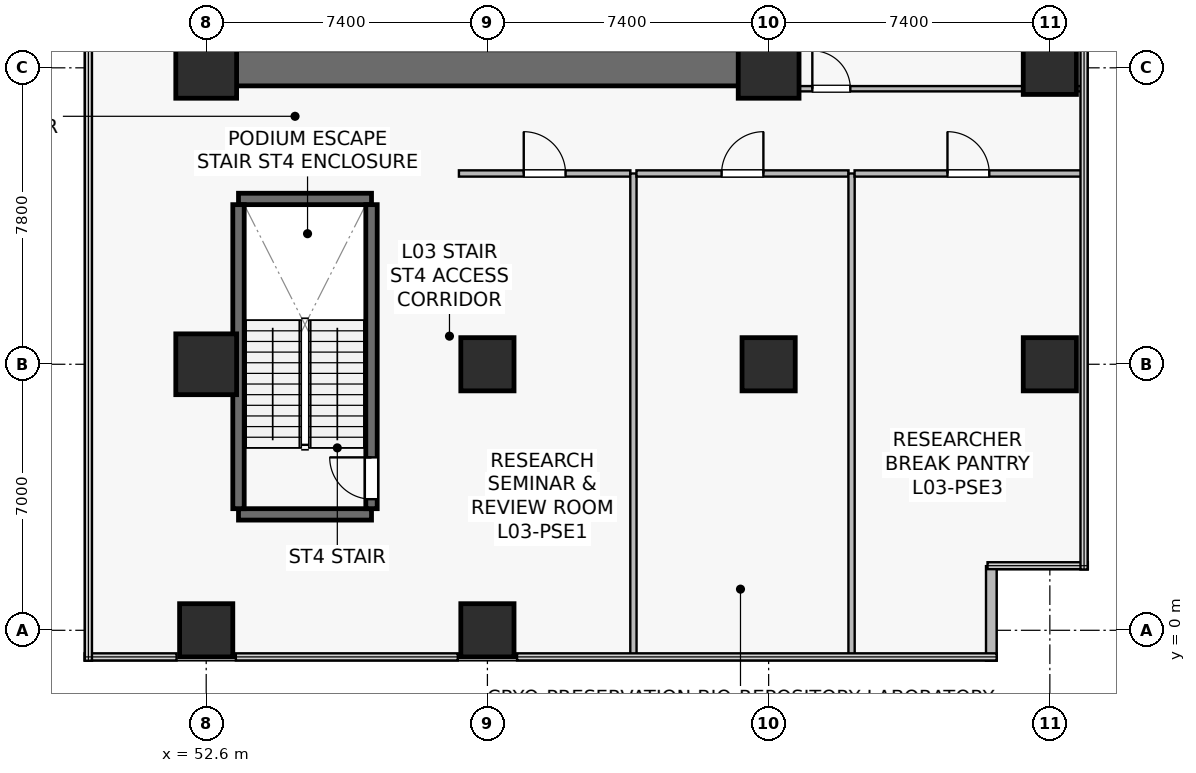
"""IFC4 building model, lengths in metres.
Left out: names, types, materials, properties, quantities, classifications, styles, units other than length and angle.
Written with IfcOpenShell. Run it as: python <this file> out.ifc"""

import sys

from ifc_helpers import new_model, si_unit, direction, frame, frame_2d, origin, origin_2d, place, context, subcontext, project, spatial, rectangle, extrude, source, transform, mapped, element, fill, save


model = new_model("IFC4")
c1 = context("Model", 3, precision=1e-05, world=origin(), true_north=direction((0.0, 1.0)))
c2 = subcontext(c1, "Body", "Model", "MODEL_VIEW")
j1 = project(units=[si_unit("LENGTHUNIT", "METRE"), si_unit("PLANEANGLEUNIT", "RADIAN")], contexts=[c1])
p1 = place(None, origin())
s1 = spatial("IfcSite", under=j1, at=p1, CompositionType="ELEMENT")
p2 = place(p1, origin())
s2 = spatial("IfcBuilding", under=s1, at=p2, CompositionType="ELEMENT")
p3 = place(p2, frame((0.0, 0.0, 10.2)))
s3 = spatial("IfcBuildingStorey", under=s2, at=p3, CompositionType="ELEMENT", Elevation=10.2)
p4 = place(p3, frame((52.125, 14.8, 0.0), z_axis=(0.0, 0.0, 1.0), x_axis=(1.0, 0.0, 0.0)))
e1 = element("IfcWall", 1, at=p4, inside=s3, PredefinedType="SHEAR", context=c2, shape_type="SweptSolid", body=[
    extrude(rectangle(XDim=15.75, YDim=0.95, at=frame_2d((7.875, 0.0))), origin(), (0.0, 0.0, 1.0), 4.45),
])
for number, where, z_axis, x_axis in (
    (2, (53.45, 3.05, 0.0), (0.0, 0.0, 1.0), (1.0, 0.0, 0.0)),
    (3, (53.45, 11.35, 0.0), (0.0, 0.0, 1.0), (1.0, 0.0, 0.0)),
):
    element("IfcWall", number, at=place(p3, frame(where, z_axis=z_axis, x_axis=x_axis)), inside=s3, PredefinedType="SHEAR", context=c2, shape_type="SweptSolid", body=[
        extrude(rectangle(XDim=3.5, YDim=0.3, at=frame_2d((1.75, 0.0))), origin(), (0.0, 0.0, 1.0), 4.45),
    ])
p5 = place(p3, frame((53.45, 3.2, 0.0), z_axis=(0.0, 0.0, 1.0), x_axis=(0.0, 1.0, 0.0)))
e4 = element("IfcWall", 4, at=p5, inside=s3, PredefinedType="SHEAR", context=c2, shape_type="SweptSolid", body=[
    extrude(rectangle(XDim=8.0, YDim=0.3, at=frame_2d((4.0, 0.0))), origin(), (0.0, 0.0, 1.0), 4.45),
])
p6 = place(p3, frame((56.95, 3.2, 0.0), z_axis=(0.0, 0.0, 1.0), x_axis=(0.0, 1.0, 0.0)))
e5 = element("IfcWall", 5, at=p6, inside=s3, PredefinedType="SHEAR", context=c2, shape_type="SweptSolid", body=[
    extrude(rectangle(XDim=8.0, YDim=0.3, at=frame_2d((4.0, 0.0))), origin(), (0.0, 0.0, 1.0), 4.45),
])
p7 = place(p6, frame((0.25, 0.0, 0.0)))
e6 = element("IfcOpeningElement", 6, at=p7, cuts=e5, PredefinedType="OPENING", context=c2, shape_type="SweptSolid", body=[
    extrude(rectangle(XDim=1.1, YDim=2.15, at=frame_2d((0.55, 1.075))), frame((0.0, 0.16, 0.0), z_axis=(0.0, -1.0, 0.0), x_axis=(1.0, 0.0, 0.0)), (0.0, 0.0, 1.0), 0.32),
])
m1 = source(origin(), c2, "Body", "SweptSolid", [
    extrude(rectangle(XDim=1.6, YDim=1.6, at=origin_2d()), origin(), (0.0, 0.0, 1.0), 4.8),
])
p8 = place(p3, frame((52.6, 7.0, 0.0), z_axis=(0.0, 0.0, 1.0), x_axis=(1.0, 0.0, 0.0)))
e7 = element("IfcColumn", 7, at=p8, inside=s3, PredefinedType="COLUMN", context=c2, shape_type="MappedRepresentation", body=[
    mapped(m1, transform((0.0, 0.0, 0.0), scale=1.0)),
])
m2 = source(origin(), c2, "Body", "SweptSolid", [
    extrude(rectangle(XDim=1.4, YDim=1.4, at=origin_2d()), origin(), (0.0, 0.0, 1.0), 4.8),
])
p9 = place(p3, frame((60.0, 7.0, 0.0), z_axis=(0.0, 0.0, 1.0), x_axis=(1.0, 0.0, 0.0)))
e8 = element("IfcColumn", 8, at=p9, inside=s3, PredefinedType="COLUMN", context=c2, shape_type="MappedRepresentation", body=[
    mapped(m2, transform((0.0, 0.0, 0.0), scale=1.0)),
])
for number, where, z_axis, x_axis in (
    (9, (52.6, 14.8, 0.0), (0.0, 0.0, 1.0), (1.0, 0.0, 0.0)),
    (10, (67.4, 14.8, 0.0), (0.0, 0.0, 1.0), (1.0, 0.0, 0.0)),
):
    element("IfcColumn", number, at=place(p3, frame(where, z_axis=z_axis, x_axis=x_axis)), inside=s3, PredefinedType="COLUMN", context=c2, shape_type="MappedRepresentation", body=[
        mapped(m1, transform((0.0, 0.0, 0.0), scale=1.0)),
    ])
for number, where, z_axis, x_axis in (
    (11, (67.4, 7.0, 0.0), (0.0, 0.0, 1.0), (1.0, 0.0, 0.0)),
    (12, (74.8, 7.0, 0.0), (0.0, 0.0, 1.0), (1.0, 0.0, 0.0)),
    (13, (74.8, 14.8, 0.0), (0.0, 0.0, 1.0), (1.0, 0.0, 0.0)),
    (14, (52.6, 0.0, 0.0), (0.0, 0.0, 1.0), (1.0, 0.0, 0.0)),
    (15, (60.0, 0.0, 0.0), (0.0, 0.0, 1.0), (1.0, 0.0, 0.0)),
):
    element("IfcColumn", number, at=place(p3, frame(where, z_axis=z_axis, x_axis=x_axis)), inside=s3, PredefinedType="COLUMN", context=c2, shape_type="MappedRepresentation", body=[
        mapped(m2, transform((0.0, 0.0, 0.0), scale=1.0)),
    ])
p10 = place(p3, frame((73.26, -0.8, 0.0), z_axis=(0.0, 0.0, 1.0), x_axis=(0.0, 1.0, 0.0)))
e16 = element("IfcWall", 16, at=p10, inside=s3, PredefinedType="STANDARD", context=c2, shape_type="SweptSolid", body=[
    extrude(rectangle(XDim=2.488, YDim=0.28, at=frame_2d((1.244, 0.0))), origin(), (0.0, 0.0, 1.0), 4.45),
])
p11 = place(p3, frame((68.0, 14.25, 0.0), z_axis=(0.0, 0.0, 1.0), x_axis=(1.0, 0.0, 0.0)))
e17 = element("IfcWall", 17, at=p11, inside=s3, PredefinedType="PARTITIONING", context=c2, shape_type="SweptSolid", body=[
    extrude(rectangle(XDim=7.65, YDim=0.14, at=frame_2d((3.825, 0.0))), origin(), (0.0, 0.0, 1.0), 3.835),
])
p12 = place(p11, frame((0.55, 0.0, 0.0)))
e18 = element("IfcOpeningElement", 18, at=p12, cuts=e17, PredefinedType="OPENING", context=c2, shape_type="SweptSolid", body=[
    extrude(rectangle(XDim=1.0, YDim=2.15, at=frame_2d((0.5, 1.075))), frame((0.0, 0.08, 0.0), z_axis=(0.0, -1.0, 0.0), x_axis=(1.0, 0.0, 0.0)), (0.0, 0.0, 1.0), 0.16),
])
p13 = place(p3, frame((59.25, 12.02, 0.0), z_axis=(0.0, 0.0, 1.0), x_axis=(1.0, 0.0, 0.0)))
e19 = element("IfcWall", 19, at=p13, inside=s3, PredefinedType="PARTITIONING", context=c2, shape_type="SweptSolid", body=[
    extrude(rectangle(XDim=4.512, YDim=0.165, at=frame_2d((2.256, 0.0))), origin(), (0.0, 0.0, 1.0), 3.735),
])
p14 = place(p13, frame((1.706, 0.0, 0.0)))
e20 = element("IfcOpeningElement", 20, at=p14, cuts=e19, PredefinedType="OPENING", context=c2, shape_type="SweptSolid", body=[
    extrude(rectangle(XDim=1.1, YDim=2.18, at=frame_2d((0.55, 1.09))), frame((0.0, 0.093, 0.0), z_axis=(0.0, -1.0, 0.0), x_axis=(1.0, 0.0, 0.0)), (0.0, 0.0, 1.0), 0.185),
])
p15 = place(p3, frame((63.842, -0.69, 0.0), z_axis=(0.0, 0.0, 1.0), x_axis=(0.0, 1.0, 0.0)))
e21 = element("IfcWall", 21, at=p15, inside=s3, PredefinedType="PARTITIONING", context=c2, shape_type="SweptSolid", body=[
    extrude(rectangle(XDim=12.71, YDim=0.165, at=frame_2d((6.355, 0.0))), origin(), (0.0, 0.0, 1.0), 3.635),
])
p16 = place(p3, frame((63.922, 12.02, 0.0), z_axis=(0.0, 0.0, 1.0), x_axis=(1.0, 0.0, 0.0)))
e22 = element("IfcWall", 22, at=p16, inside=s3, PredefinedType="PARTITIONING", context=c2, shape_type="SweptSolid", body=[
    extrude(rectangle(XDim=5.58, YDim=0.165, at=frame_2d((2.79, 0.0))), origin(), (0.0, 0.0, 1.0), 3.735),
])
p17 = place(p16, frame((2.24, 0.0, 0.0)))
e23 = element("IfcOpeningElement", 23, at=p17, cuts=e22, PredefinedType="OPENING", context=c2, shape_type="SweptSolid", body=[
    extrude(rectangle(XDim=1.1, YDim=2.18, at=frame_2d((0.55, 1.09))), frame((0.0, 0.093, 0.0), z_axis=(0.0, -1.0, 0.0), x_axis=(1.0, 0.0, 0.0)), (0.0, 0.0, 1.0), 0.185),
])
p18 = place(p3, frame((69.582, -0.69, 0.0), z_axis=(0.0, 0.0, 1.0), x_axis=(0.0, 1.0, 0.0)))
e24 = element("IfcWall", 24, at=p18, inside=s3, PredefinedType="PARTITIONING", context=c2, shape_type="SweptSolid", body=[
    extrude(rectangle(XDim=12.71, YDim=0.165, at=frame_2d((6.355, 0.0))), origin(), (0.0, 0.0, 1.0), 3.635),
])
p19 = place(p3, frame((69.662, 12.02, 0.0), z_axis=(0.0, 0.0, 1.0), x_axis=(1.0, 0.0, 0.0)))
e25 = element("IfcWall", 25, at=p19, inside=s3, PredefinedType="PARTITIONING", context=c2, shape_type="SweptSolid", body=[
    extrude(rectangle(XDim=5.988, YDim=0.165, at=frame_2d((2.994, 0.0))), origin(), (0.0, 0.0, 1.0), 3.835),
])
p20 = place(p19, frame((2.444, 0.0, 0.0)))
e26 = element("IfcOpeningElement", 26, at=p20, cuts=e25, PredefinedType="OPENING", context=c2, shape_type="SweptSolid", body=[
    extrude(rectangle(XDim=1.1, YDim=2.18, at=frame_2d((0.55, 1.09))), frame((0.0, 0.093, 0.0), z_axis=(0.0, -1.0, 0.0), x_axis=(1.0, 0.0, 0.0)), (0.0, 0.0, 1.0), 0.185),
])
m3 = source(origin(), c2, "Body", "SweptSolid", [
    extrude(rectangle(XDim=1.1, YDim=2.15, at=frame_2d((0.55, 1.075))), frame((0.0, 0.025, 0.0), z_axis=(0.0, -1.0, 0.0), x_axis=(1.0, 0.0, 0.0)), (0.0, 0.0, 1.0), 0.05),
])
p21 = place(p7, origin())
e27 = element("IfcDoor", 27, at=p21, inside=s3, OperationType="SINGLE_SWING_RIGHT", PredefinedType="DOOR", context=c2, shape_type="MappedRepresentation", body=[
    mapped(m3, transform((0.0, 0.0, 0.0), scale=1.0)),
])
fill(e6, e27)
m4 = source(origin(), c2, "Body", "SweptSolid", [
    extrude(rectangle(XDim=1.0, YDim=2.15, at=frame_2d((0.5, 1.075))), frame((0.0, 0.025, 0.0), z_axis=(0.0, -1.0, 0.0), x_axis=(1.0, 0.0, 0.0)), (0.0, 0.0, 1.0), 0.05),
])
p22 = place(p12, origin())
e28 = element("IfcDoor", 28, at=p22, inside=s3, OperationType="SINGLE_SWING_LEFT", PredefinedType="DOOR", context=c2, shape_type="MappedRepresentation", body=[
    mapped(m4, transform((0.0, 0.0, 0.0), scale=1.0)),
])
fill(e18, e28)
m5 = source(origin(), c2, "Body", "SweptSolid", [
    extrude(rectangle(XDim=1.1, YDim=2.18, at=frame_2d((0.55, 1.09))), frame((0.0, 0.025, 0.0), z_axis=(0.0, -1.0, 0.0), x_axis=(1.0, 0.0, 0.0)), (0.0, 0.0, 1.0), 0.05),
])
p23 = place(p14, origin())
e29 = element("IfcDoor", 29, at=p23, inside=s3, OperationType="SINGLE_SWING_LEFT", PredefinedType="DOOR", context=c2, shape_type="MappedRepresentation", body=[
    mapped(m5, transform((0.0, 0.0, 0.0), scale=1.0)),
])
fill(e20, e29)
p24 = place(p17, origin())
e30 = element("IfcDoor", 30, at=p24, inside=s3, OperationType="SINGLE_SWING_RIGHT", PredefinedType="DOOR", context=c2, shape_type="MappedRepresentation", body=[
    mapped(m5, transform((0.0, 0.0, 0.0), scale=1.0)),
])
fill(e23, e30)
p25 = place(p20, origin())
e31 = element("IfcDoor", 31, at=p25, inside=s3, OperationType="SINGLE_SWING_LEFT", PredefinedType="DOOR", context=c2, shape_type="MappedRepresentation", body=[
    mapped(m5, transform((0.0, 0.0, 0.0), scale=1.0)),
])
fill(e26, e31)
save(model, sys.argv[1])
